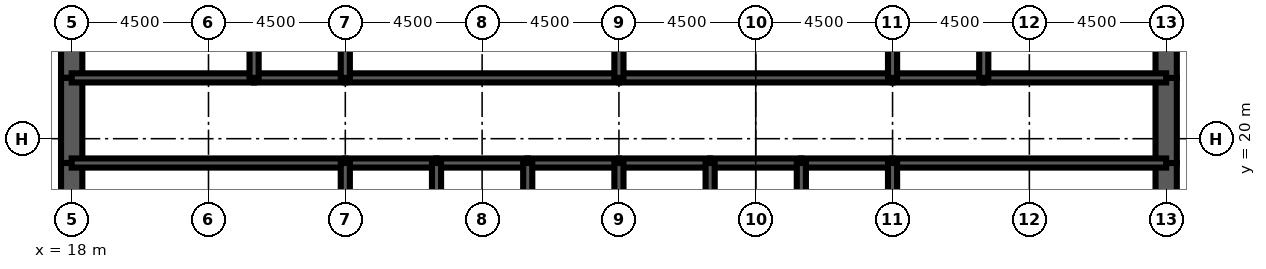
"""IFC4 building model, lengths in metres.
Left out: names, types, materials, properties, quantities, classifications, styles, units other than length and angle.
Written with IfcOpenShell. Run it as: python <this file> out.ifc"""

import sys

from ifc_helpers import new_model, si_unit, direction, frame, frame_2d, origin, place, context, subcontext, project, spatial, rectangle, extrude, element, fill, save


model = new_model("IFC4")
c1 = context("Model", 3, precision=1e-05, world=origin(), true_north=direction((0.0, 1.0)))
c2 = subcontext(c1, "Body", "Model", "MODEL_VIEW")
j1 = project(units=[si_unit("LENGTHUNIT", "METRE"), si_unit("PLANEANGLEUNIT", "RADIAN")], contexts=[c1])
p1 = place(None, origin())
s1 = spatial("IfcSite", under=j1, at=p1, CompositionType="ELEMENT")
p2 = place(p1, origin())
s2 = spatial("IfcBuilding", under=s1, at=p2, CompositionType="ELEMENT")
p3 = place(p2, frame((0.0, 0.0, 313.1)))
s3 = spatial("IfcBuildingStorey", under=s2, at=p3, CompositionType="ELEMENT", Elevation=313.1)
p4 = place(p3, frame((18.0, 26.0, 0.0), z_axis=(0.0, 0.0, 1.0), x_axis=(0.0, -1.0, 0.0)))
e1 = element("IfcWall", 1, at=p4, inside=s3, PredefinedType="SHEAR", context=c2, shape_type="SweptSolid", body=[
    extrude(rectangle(XDim=4.0, YDim=0.7, at=frame_2d((2.0, 0.0))), origin(), (0.0, 0.0, 1.0), 4.2),
])
p5 = place(p3, frame((18.0, 22.0, 0.0), z_axis=(0.0, 0.0, 1.0), x_axis=(0.0, -1.0, 0.0)))
e2 = element("IfcWall", 2, at=p5, inside=s3, PredefinedType="SHEAR", context=c2, shape_type="SweptSolid", body=[
    extrude(rectangle(XDim=2.8, YDim=0.7, at=frame_2d((1.4, 0.0))), origin(), (0.0, 0.0, 1.0), 4.2),
])
p6 = place(p5, frame((0.6, 0.0, 0.0)))
e3 = element("IfcOpeningElement", 3, at=p6, cuts=e2, PredefinedType="OPENING", context=c2, shape_type="SweptSolid", body=[
    extrude(rectangle(XDim=1.8, YDim=2.1, at=frame_2d((0.9, 1.05))), frame((0.0, 0.36, 0.0), z_axis=(0.0, -1.0, 0.0), x_axis=(1.0, 0.0, 0.0)), (0.0, 0.0, 1.0), 0.72),
])
for number, where, z_axis, x_axis in (
    (4, (18.0, 19.2, 0.0), (0.0, 0.0, 1.0), (0.0, -1.0, 0.0)),
    (5, (54.0, 16.0, 0.0), (0.0, 0.0, 1.0), (0.0, 1.0, 0.0)),
):
    element("IfcWall", number, at=place(p3, frame(where, z_axis=z_axis, x_axis=x_axis)), inside=s3, PredefinedType="SHEAR", context=c2, shape_type="SweptSolid", body=[
        extrude(rectangle(XDim=3.2, YDim=0.7, at=frame_2d((1.6, 0.0))), origin(), (0.0, 0.0, 1.0), 4.2),
    ])
p7 = place(p3, frame((54.0, 19.2, 0.0), z_axis=(0.0, 0.0, 1.0), x_axis=(0.0, 1.0, 0.0)))
e6 = element("IfcWall", 6, at=p7, inside=s3, PredefinedType="SHEAR", context=c2, shape_type="SweptSolid", body=[
    extrude(rectangle(XDim=2.8, YDim=0.7, at=frame_2d((1.4, 0.0))), origin(), (0.0, 0.0, 1.0), 4.2),
])
p8 = place(p7, frame((0.4, 0.0, 0.0)))
e7 = element("IfcOpeningElement", 7, at=p8, cuts=e6, PredefinedType="OPENING", context=c2, shape_type="SweptSolid", body=[
    extrude(rectangle(XDim=1.8, YDim=2.1, at=frame_2d((0.9, 1.05))), frame((0.0, 0.36, 0.0), z_axis=(0.0, -1.0, 0.0), x_axis=(1.0, 0.0, 0.0)), (0.0, 0.0, 1.0), 0.72),
])
p9 = place(p3, frame((54.0, 22.0, 0.0), z_axis=(0.0, 0.0, 1.0), x_axis=(0.0, 1.0, 0.0)))
e8 = element("IfcWall", 8, at=p9, inside=s3, PredefinedType="SHEAR", context=c2, shape_type="SweptSolid", body=[
    extrude(rectangle(XDim=4.0, YDim=0.7, at=frame_2d((2.0, 0.0))), origin(), (0.0, 0.0, 1.0), 4.2),
])
p10 = place(p3, frame((18.0, 19.2, 0.0), z_axis=(0.0, 0.0, 1.0), x_axis=(1.0, 0.0, 0.0)))
e9 = element("IfcWall", 9, at=p10, inside=s3, PredefinedType="SOLIDWALL", context=c2, shape_type="SweptSolid", body=[
    extrude(rectangle(XDim=9.0, YDim=0.3, at=frame_2d((4.5, 0.0))), origin(), (0.0, 0.0, 1.0), 4.2),
])
p11 = place(p10, frame((0.65, 0.0, 0.0)))
e10 = element("IfcOpeningElement", 10, at=p11, cuts=e9, PredefinedType="OPENING", context=c2, shape_type="SweptSolid", body=[
    extrude(rectangle(XDim=1.0, YDim=2.1, at=frame_2d((0.5, 1.05))), frame((0.0, 0.16, 0.0), z_axis=(0.0, -1.0, 0.0), x_axis=(1.0, 0.0, 0.0)), (0.0, 0.0, 1.0), 0.32),
])
p12 = place(p3, frame((27.0, 19.2, 0.0), z_axis=(0.0, 0.0, 1.0), x_axis=(1.0, 0.0, 0.0)))
e11 = element("IfcWall", 11, at=p12, inside=s3, PredefinedType="SOLIDWALL", context=c2, shape_type="SweptSolid", body=[
    extrude(rectangle(XDim=3.0, YDim=0.3, at=frame_2d((1.5, 0.0))), origin(), (0.0, 0.0, 1.0), 4.2),
])
p13 = place(p12, frame((0.95, 0.0, 0.0)))
e12 = element("IfcOpeningElement", 12, at=p13, cuts=e11, PredefinedType="OPENING", context=c2, shape_type="SweptSolid", body=[
    extrude(rectangle(XDim=1.1, YDim=2.2, at=frame_2d((0.55, 1.1))), frame((0.0, 0.16, 0.0), z_axis=(0.0, -1.0, 0.0), x_axis=(1.0, 0.0, 0.0)), (0.0, 0.0, 1.0), 0.32),
])
p14 = place(p3, frame((30.0, 19.2, 0.0), z_axis=(0.0, 0.0, 1.0), x_axis=(1.0, 0.0, 0.0)))
e13 = element("IfcWall", 13, at=p14, inside=s3, PredefinedType="SOLIDWALL", context=c2, shape_type="SweptSolid", body=[
    extrude(rectangle(XDim=3.0, YDim=0.3, at=frame_2d((1.5, 0.0))), origin(), (0.0, 0.0, 1.0), 4.2),
])
p15 = place(p14, frame((0.95, 0.0, 0.0)))
e14 = element("IfcOpeningElement", 14, at=p15, cuts=e13, PredefinedType="OPENING", context=c2, shape_type="SweptSolid", body=[
    extrude(rectangle(XDim=1.1, YDim=2.2, at=frame_2d((0.55, 1.1))), frame((0.0, 0.16, 0.0), z_axis=(0.0, -1.0, 0.0), x_axis=(1.0, 0.0, 0.0)), (0.0, 0.0, 1.0), 0.32),
])
p16 = place(p3, frame((33.0, 19.2, 0.0), z_axis=(0.0, 0.0, 1.0), x_axis=(1.0, 0.0, 0.0)))
e15 = element("IfcWall", 15, at=p16, inside=s3, PredefinedType="SOLIDWALL", context=c2, shape_type="SweptSolid", body=[
    extrude(rectangle(XDim=3.0, YDim=0.3, at=frame_2d((1.5, 0.0))), origin(), (0.0, 0.0, 1.0), 4.2),
])
p17 = place(p16, frame((0.95, 0.0, 0.0)))
e16 = element("IfcOpeningElement", 16, at=p17, cuts=e15, PredefinedType="OPENING", context=c2, shape_type="SweptSolid", body=[
    extrude(rectangle(XDim=1.1, YDim=2.2, at=frame_2d((0.55, 1.1))), frame((0.0, 0.16, 0.0), z_axis=(0.0, -1.0, 0.0), x_axis=(1.0, 0.0, 0.0)), (0.0, 0.0, 1.0), 0.32),
])
p18 = place(p3, frame((36.0, 19.2, 0.0), z_axis=(0.0, 0.0, 1.0), x_axis=(1.0, 0.0, 0.0)))
e17 = element("IfcWall", 17, at=p18, inside=s3, PredefinedType="SOLIDWALL", context=c2, shape_type="SweptSolid", body=[
    extrude(rectangle(XDim=3.0, YDim=0.3, at=frame_2d((1.5, 0.0))), origin(), (0.0, 0.0, 1.0), 4.2),
])
p19 = place(p18, frame((0.95, 0.0, 0.0)))
e18 = element("IfcOpeningElement", 18, at=p19, cuts=e17, PredefinedType="OPENING", context=c2, shape_type="SweptSolid", body=[
    extrude(rectangle(XDim=1.1, YDim=2.2, at=frame_2d((0.55, 1.1))), frame((0.0, 0.16, 0.0), z_axis=(0.0, -1.0, 0.0), x_axis=(1.0, 0.0, 0.0)), (0.0, 0.0, 1.0), 0.32),
])
p20 = place(p3, frame((39.0, 19.2, 0.0), z_axis=(0.0, 0.0, 1.0), x_axis=(1.0, 0.0, 0.0)))
e19 = element("IfcWall", 19, at=p20, inside=s3, PredefinedType="SOLIDWALL", context=c2, shape_type="SweptSolid", body=[
    extrude(rectangle(XDim=3.0, YDim=0.3, at=frame_2d((1.5, 0.0))), origin(), (0.0, 0.0, 1.0), 4.2),
])
p21 = place(p20, frame((1.0, 0.0, 0.0)))
e20 = element("IfcOpeningElement", 20, at=p21, cuts=e19, PredefinedType="OPENING", context=c2, shape_type="SweptSolid", body=[
    extrude(rectangle(XDim=1.0, YDim=2.1, at=frame_2d((0.5, 1.05))), frame((0.0, 0.16, 0.0), z_axis=(0.0, -1.0, 0.0), x_axis=(1.0, 0.0, 0.0)), (0.0, 0.0, 1.0), 0.32),
])
p22 = place(p3, frame((42.0, 19.2, 0.0), z_axis=(0.0, 0.0, 1.0), x_axis=(1.0, 0.0, 0.0)))
e21 = element("IfcWall", 21, at=p22, inside=s3, PredefinedType="SOLIDWALL", context=c2, shape_type="SweptSolid", body=[
    extrude(rectangle(XDim=3.0, YDim=0.3, at=frame_2d((1.5, 0.0))), origin(), (0.0, 0.0, 1.0), 4.2),
])
p23 = place(p22, frame((1.0, 0.0, 0.0)))
e22 = element("IfcOpeningElement", 22, at=p23, cuts=e21, PredefinedType="OPENING", context=c2, shape_type="SweptSolid", body=[
    extrude(rectangle(XDim=1.0, YDim=2.1, at=frame_2d((0.5, 1.05))), frame((0.0, 0.16, 0.0), z_axis=(0.0, -1.0, 0.0), x_axis=(1.0, 0.0, 0.0)), (0.0, 0.0, 1.0), 0.32),
])
p24 = place(p3, frame((45.0, 19.2, 0.0), z_axis=(0.0, 0.0, 1.0), x_axis=(1.0, 0.0, 0.0)))
e23 = element("IfcWall", 23, at=p24, inside=s3, PredefinedType="SOLIDWALL", context=c2, shape_type="SweptSolid", body=[
    extrude(rectangle(XDim=9.0, YDim=0.3, at=frame_2d((4.5, 0.0))), origin(), (0.0, 0.0, 1.0), 4.2),
])
p25 = place(p24, frame((7.35, 0.0, 0.0)))
e24 = element("IfcOpeningElement", 24, at=p25, cuts=e23, PredefinedType="OPENING", context=c2, shape_type="SweptSolid", body=[
    extrude(rectangle(XDim=1.0, YDim=2.1, at=frame_2d((0.5, 1.05))), frame((0.0, 0.16, 0.0), z_axis=(0.0, -1.0, 0.0), x_axis=(1.0, 0.0, 0.0)), (0.0, 0.0, 1.0), 0.32),
])
p26 = place(p3, frame((18.0, 22.0, 0.0), z_axis=(0.0, 0.0, 1.0), x_axis=(1.0, 0.0, 0.0)))
e25 = element("IfcWall", 25, at=p26, inside=s3, PredefinedType="SOLIDWALL", context=c2, shape_type="SweptSolid", body=[
    extrude(rectangle(XDim=6.0, YDim=0.3, at=frame_2d((3.0, 0.0))), origin(), (0.0, 0.0, 1.0), 4.2),
])
p27 = place(p26, frame((4.4, 0.0, 0.0)))
e26 = element("IfcOpeningElement", 26, at=p27, cuts=e25, PredefinedType="OPENING", context=c2, shape_type="SweptSolid", body=[
    extrude(rectangle(XDim=1.0, YDim=2.1, at=frame_2d((0.5, 1.05))), frame((0.0, 0.16, 0.0), z_axis=(0.0, -1.0, 0.0), x_axis=(1.0, 0.0, 0.0)), (0.0, 0.0, 1.0), 0.32),
])
p28 = place(p26, frame((0.75, 0.0, 0.0)))
e27 = element("IfcOpeningElement", 27, at=p28, cuts=e25, PredefinedType="OPENING", context=c2, shape_type="SweptSolid", body=[
    extrude(rectangle(XDim=1.0, YDim=2.1, at=frame_2d((0.5, 1.05))), frame((0.0, 0.16, 0.0), z_axis=(0.0, -1.0, 0.0), x_axis=(1.0, 0.0, 0.0)), (0.0, 0.0, 1.0), 0.32),
])
p29 = place(p3, frame((24.0, 22.0, 0.0), z_axis=(0.0, 0.0, 1.0), x_axis=(1.0, 0.0, 0.0)))
e28 = element("IfcWall", 28, at=p29, inside=s3, PredefinedType="SOLIDWALL", context=c2, shape_type="SweptSolid", body=[
    extrude(rectangle(XDim=3.0, YDim=0.3, at=frame_2d((1.5, 0.0))), origin(), (0.0, 0.0, 1.0), 4.2),
])
p30 = place(p29, frame((1.0, 0.0, 0.0)))
e29 = element("IfcOpeningElement", 29, at=p30, cuts=e28, PredefinedType="OPENING", context=c2, shape_type="SweptSolid", body=[
    extrude(rectangle(XDim=1.0, YDim=2.1, at=frame_2d((0.5, 1.05))), frame((0.0, 0.16, 0.0), z_axis=(0.0, -1.0, 0.0), x_axis=(1.0, 0.0, 0.0)), (0.0, 0.0, 1.0), 0.32),
])
p31 = place(p3, frame((27.0, 22.0, 0.0), z_axis=(0.0, 0.0, 1.0), x_axis=(1.0, 0.0, 0.0)))
e30 = element("IfcWall", 30, at=p31, inside=s3, PredefinedType="SOLIDWALL", context=c2, shape_type="SweptSolid", body=[
    extrude(rectangle(XDim=9.0, YDim=0.3, at=frame_2d((4.5, 0.0))), origin(), (0.0, 0.0, 1.0), 4.2),
])
p32 = place(p31, frame((4.0, 0.0, 0.0)))
e31 = element("IfcOpeningElement", 31, at=p32, cuts=e30, PredefinedType="OPENING", context=c2, shape_type="SweptSolid", body=[
    extrude(rectangle(XDim=1.0, YDim=2.1, at=frame_2d((0.5, 1.05))), frame((0.0, 0.16, 0.0), z_axis=(0.0, -1.0, 0.0), x_axis=(1.0, 0.0, 0.0)), (0.0, 0.0, 1.0), 0.32),
])
p33 = place(p3, frame((36.0, 22.0, 0.0), z_axis=(0.0, 0.0, 1.0), x_axis=(1.0, 0.0, 0.0)))
e32 = element("IfcWall", 32, at=p33, inside=s3, PredefinedType="SOLIDWALL", context=c2, shape_type="SweptSolid", body=[
    extrude(rectangle(XDim=9.0, YDim=0.3, at=frame_2d((4.5, 0.0))), origin(), (0.0, 0.0, 1.0), 4.2),
])
p34 = place(p33, frame((4.0, 0.0, 0.0)))
e33 = element("IfcOpeningElement", 33, at=p34, cuts=e32, PredefinedType="OPENING", context=c2, shape_type="SweptSolid", body=[
    extrude(rectangle(XDim=1.0, YDim=2.1, at=frame_2d((0.5, 1.05))), frame((0.0, 0.16, 0.0), z_axis=(0.0, -1.0, 0.0), x_axis=(1.0, 0.0, 0.0)), (0.0, 0.0, 1.0), 0.32),
])
p35 = place(p3, frame((45.0, 22.0, 0.0), z_axis=(0.0, 0.0, 1.0), x_axis=(1.0, 0.0, 0.0)))
e34 = element("IfcWall", 34, at=p35, inside=s3, PredefinedType="SOLIDWALL", context=c2, shape_type="SweptSolid", body=[
    extrude(rectangle(XDim=3.0, YDim=0.3, at=frame_2d((1.5, 0.0))), origin(), (0.0, 0.0, 1.0), 4.2),
])
p36 = place(p35, frame((1.0, 0.0, 0.0)))
e35 = element("IfcOpeningElement", 35, at=p36, cuts=e34, PredefinedType="OPENING", context=c2, shape_type="SweptSolid", body=[
    extrude(rectangle(XDim=1.0, YDim=2.1, at=frame_2d((0.5, 1.05))), frame((0.0, 0.16, 0.0), z_axis=(0.0, -1.0, 0.0), x_axis=(1.0, 0.0, 0.0)), (0.0, 0.0, 1.0), 0.32),
])
p37 = place(p3, frame((48.0, 22.0, 0.0), z_axis=(0.0, 0.0, 1.0), x_axis=(1.0, 0.0, 0.0)))
e36 = element("IfcWall", 36, at=p37, inside=s3, PredefinedType="SOLIDWALL", context=c2, shape_type="SweptSolid", body=[
    extrude(rectangle(XDim=6.0, YDim=0.3, at=frame_2d((3.0, 0.0))), origin(), (0.0, 0.0, 1.0), 4.2),
])
p38 = place(p37, frame((2.0, 0.0, 0.0)))
e37 = element("IfcOpeningElement", 37, at=p38, cuts=e36, PredefinedType="OPENING", context=c2, shape_type="SweptSolid", body=[
    extrude(rectangle(XDim=1.0, YDim=2.1, at=frame_2d((0.5, 1.05))), frame((0.0, 0.16, 0.0), z_axis=(0.0, -1.0, 0.0), x_axis=(1.0, 0.0, 0.0)), (0.0, 0.0, 1.0), 0.32),
])
p39 = place(p37, frame((4.25, 0.0, 0.0)))
e38 = element("IfcOpeningElement", 38, at=p39, cuts=e36, PredefinedType="OPENING", context=c2, shape_type="SweptSolid", body=[
    extrude(rectangle(XDim=1.0, YDim=2.1, at=frame_2d((0.5, 1.05))), frame((0.0, 0.16, 0.0), z_axis=(0.0, -1.0, 0.0), x_axis=(1.0, 0.0, 0.0)), (0.0, 0.0, 1.0), 0.32),
])
for number, where, z_axis, x_axis in (
    (39, (27.0, 16.0, 0.0), (0.0, 0.0, 1.0), (0.0, 1.0, 0.0)),
    (40, (30.0, 16.0, 0.0), (0.0, 0.0, 1.0), (0.0, 1.0, 0.0)),
    (41, (33.0, 16.0, 0.0), (0.0, 0.0, 1.0), (0.0, 1.0, 0.0)),
    (42, (36.0, 16.0, 0.0), (0.0, 0.0, 1.0), (0.0, 1.0, 0.0)),
    (43, (39.0, 16.0, 0.0), (0.0, 0.0, 1.0), (0.0, 1.0, 0.0)),
    (44, (42.0, 16.0, 0.0), (0.0, 0.0, 1.0), (0.0, 1.0, 0.0)),
    (45, (45.0, 16.0, 0.0), (0.0, 0.0, 1.0), (0.0, 1.0, 0.0)),
):
    element("IfcWall", number, at=place(p3, frame(where, z_axis=z_axis, x_axis=x_axis)), inside=s3, PredefinedType="SOLIDWALL", context=c2, shape_type="SweptSolid", body=[
        extrude(rectangle(XDim=3.2, YDim=0.3, at=frame_2d((1.6, 0.0))), origin(), (0.0, 0.0, 1.0), 4.2),
    ])
for number, where, z_axis, x_axis in (
    (46, (24.0, 22.0, 0.0), (0.0, 0.0, 1.0), (0.0, 1.0, 0.0)),
    (47, (27.0, 22.0, 0.0), (0.0, 0.0, 1.0), (0.0, 1.0, 0.0)),
    (48, (36.0, 22.0, 0.0), (0.0, 0.0, 1.0), (0.0, 1.0, 0.0)),
    (49, (45.0, 22.0, 0.0), (0.0, 0.0, 1.0), (0.0, 1.0, 0.0)),
    (50, (48.0, 22.0, 0.0), (0.0, 0.0, 1.0), (0.0, 1.0, 0.0)),
):
    element("IfcWall", number, at=place(p3, frame(where, z_axis=z_axis, x_axis=x_axis)), inside=s3, PredefinedType="SOLIDWALL", context=c2, shape_type="SweptSolid", body=[
        extrude(rectangle(XDim=4.0, YDim=0.3, at=frame_2d((2.0, 0.0))), origin(), (0.0, 0.0, 1.0), 4.2),
    ])
for number, where, z_axis, x_axis in (
    (51, (20.225, 22.15, 0.0), (0.0, 0.0, 1.0), (0.0, 1.0, 0.0)),
    (52, (51.775, 22.15, 0.0), (0.0, 0.0, 1.0), (0.0, 1.0, 0.0)),
):
    element("IfcWall", number, at=place(p3, frame(where, z_axis=z_axis, x_axis=x_axis)), inside=s3, PredefinedType="PARTITIONING", context=c2, shape_type="SweptSolid", body=[
        extrude(rectangle(XDim=3.7, YDim=0.15, at=frame_2d((1.85, 0.0))), origin(), (0.0, 0.0, 1.0), 3.0),
    ])
p40 = place(p13, origin())
e53 = element("IfcDoor", 53, at=p40, inside=s3, OperationType="DOUBLE_DOOR_SLIDING", PredefinedType="USERDEFINED", context=c2, shape_type="SweptSolid", body=[
    extrude(rectangle(XDim=1.1, YDim=2.2, at=frame_2d((0.55, 1.1))), frame((0.0, 0.025, 0.0), z_axis=(0.0, -1.0, 0.0), x_axis=(1.0, 0.0, 0.0)), (0.0, 0.0, 1.0), 0.05),
])
fill(e12, e53)
p41 = place(p15, origin())
e54 = element("IfcDoor", 54, at=p41, inside=s3, OperationType="DOUBLE_DOOR_SLIDING", PredefinedType="USERDEFINED", context=c2, shape_type="SweptSolid", body=[
    extrude(rectangle(XDim=1.1, YDim=2.2, at=frame_2d((0.55, 1.1))), frame((0.0, 0.025, 0.0), z_axis=(0.0, -1.0, 0.0), x_axis=(1.0, 0.0, 0.0)), (0.0, 0.0, 1.0), 0.05),
])
fill(e14, e54)
p42 = place(p17, origin())
e55 = element("IfcDoor", 55, at=p42, inside=s3, OperationType="DOUBLE_DOOR_SLIDING", PredefinedType="USERDEFINED", context=c2, shape_type="SweptSolid", body=[
    extrude(rectangle(XDim=1.1, YDim=2.2, at=frame_2d((0.55, 1.1))), frame((0.0, 0.025, 0.0), z_axis=(0.0, -1.0, 0.0), x_axis=(1.0, 0.0, 0.0)), (0.0, 0.0, 1.0), 0.05),
])
fill(e16, e55)
p43 = place(p19, origin())
e56 = element("IfcDoor", 56, at=p43, inside=s3, OperationType="DOUBLE_DOOR_SLIDING", PredefinedType="USERDEFINED", context=c2, shape_type="SweptSolid", body=[
    extrude(rectangle(XDim=1.1, YDim=2.2, at=frame_2d((0.55, 1.1))), frame((0.0, 0.025, 0.0), z_axis=(0.0, -1.0, 0.0), x_axis=(1.0, 0.0, 0.0)), (0.0, 0.0, 1.0), 0.05),
])
fill(e18, e56)
p44 = place(p11, origin())
e57 = element("IfcDoor", 57, at=p44, inside=s3, OperationType="SINGLE_SWING_LEFT", PredefinedType="DOOR", context=c2, shape_type="SweptSolid", body=[
    extrude(rectangle(XDim=1.0, YDim=2.1, at=frame_2d((0.5, 1.05))), frame((0.0, 0.025, 0.0), z_axis=(0.0, -1.0, 0.0), x_axis=(1.0, 0.0, 0.0)), (0.0, 0.0, 1.0), 0.05),
])
fill(e10, e57)
p45 = place(p25, origin())
e58 = element("IfcDoor", 58, at=p45, inside=s3, OperationType="SINGLE_SWING_RIGHT", PredefinedType="DOOR", context=c2, shape_type="SweptSolid", body=[
    extrude(rectangle(XDim=1.0, YDim=2.1, at=frame_2d((0.5, 1.05))), frame((0.0, 0.025, 0.0), z_axis=(0.0, -1.0, 0.0), x_axis=(1.0, 0.0, 0.0)), (0.0, 0.0, 1.0), 0.05),
])
fill(e24, e58)
p46 = place(p6, origin())
e59 = element("IfcDoor", 59, at=p46, inside=s3, OperationType="SINGLE_SWING_LEFT", PredefinedType="DOOR", context=c2, shape_type="SweptSolid", body=[
    extrude(rectangle(XDim=1.8, YDim=2.1, at=frame_2d((0.9, 1.05))), frame((0.0, 0.35, 0.0), z_axis=(0.0, -1.0, 0.0), x_axis=(1.0, 0.0, 0.0)), (0.0, 0.0, 1.0), 0.699),
])
fill(e3, e59)
p47 = place(p8, origin())
e60 = element("IfcDoor", 60, at=p47, inside=s3, OperationType="SINGLE_SWING_LEFT", PredefinedType="DOOR", context=c2, shape_type="SweptSolid", body=[
    extrude(rectangle(XDim=1.8, YDim=2.1, at=frame_2d((0.9, 1.05))), frame((0.0, 0.35, 0.0), z_axis=(0.0, -1.0, 0.0), x_axis=(1.0, 0.0, 0.0)), (0.0, 0.0, 1.0), 0.699),
])
fill(e7, e60)
p48 = place(p27, origin())
e61 = element("IfcDoor", 61, at=p48, inside=s3, OperationType="SINGLE_SWING_RIGHT", PredefinedType="DOOR", context=c2, shape_type="SweptSolid", body=[
    extrude(rectangle(XDim=1.0, YDim=2.1, at=frame_2d((0.5, 1.05))), frame((0.0, 0.025, 0.0), z_axis=(0.0, -1.0, 0.0), x_axis=(1.0, 0.0, 0.0)), (0.0, 0.0, 1.0), 0.05),
])
fill(e26, e61)
p49 = place(p30, origin())
e62 = element("IfcDoor", 62, at=p49, inside=s3, OperationType="SINGLE_SWING_LEFT", PredefinedType="DOOR", context=c2, shape_type="SweptSolid", body=[
    extrude(rectangle(XDim=1.0, YDim=2.1, at=frame_2d((0.5, 1.05))), frame((0.0, 0.025, 0.0), z_axis=(0.0, -1.0, 0.0), x_axis=(1.0, 0.0, 0.0)), (0.0, 0.0, 1.0), 0.05),
])
fill(e29, e62)
p50 = place(p32, origin())
e63 = element("IfcDoor", 63, at=p50, inside=s3, OperationType="SINGLE_SWING_LEFT", PredefinedType="DOOR", context=c2, shape_type="SweptSolid", body=[
    extrude(rectangle(XDim=1.0, YDim=2.1, at=frame_2d((0.5, 1.05))), frame((0.0, 0.025, 0.0), z_axis=(0.0, -1.0, 0.0), x_axis=(1.0, 0.0, 0.0)), (0.0, 0.0, 1.0), 0.05),
])
fill(e31, e63)
p51 = place(p34, origin())
e64 = element("IfcDoor", 64, at=p51, inside=s3, OperationType="SINGLE_SWING_LEFT", PredefinedType="DOOR", context=c2, shape_type="SweptSolid", body=[
    extrude(rectangle(XDim=1.0, YDim=2.1, at=frame_2d((0.5, 1.05))), frame((0.0, 0.025, 0.0), z_axis=(0.0, -1.0, 0.0), x_axis=(1.0, 0.0, 0.0)), (0.0, 0.0, 1.0), 0.05),
])
fill(e33, e64)
p52 = place(p36, origin())
e65 = element("IfcDoor", 65, at=p52, inside=s3, OperationType="SINGLE_SWING_LEFT", PredefinedType="DOOR", context=c2, shape_type="SweptSolid", body=[
    extrude(rectangle(XDim=1.0, YDim=2.1, at=frame_2d((0.5, 1.05))), frame((0.0, 0.025, 0.0), z_axis=(0.0, -1.0, 0.0), x_axis=(1.0, 0.0, 0.0)), (0.0, 0.0, 1.0), 0.05),
])
fill(e35, e65)
p53 = place(p38, origin())
e66 = element("IfcDoor", 66, at=p53, inside=s3, OperationType="SINGLE_SWING_LEFT", PredefinedType="DOOR", context=c2, shape_type="SweptSolid", body=[
    extrude(rectangle(XDim=1.0, YDim=2.1, at=frame_2d((0.5, 1.05))), frame((0.0, 0.025, 0.0), z_axis=(0.0, -1.0, 0.0), x_axis=(1.0, 0.0, 0.0)), (0.0, 0.0, 1.0), 0.05),
])
fill(e37, e66)
p54 = place(p28, origin())
e67 = element("IfcDoor", 67, at=p54, inside=s3, OperationType="SINGLE_SWING_LEFT", PredefinedType="DOOR", context=c2, shape_type="SweptSolid", body=[
    extrude(rectangle(XDim=1.0, YDim=2.1, at=frame_2d((0.5, 1.05))), frame((0.0, 0.025, 0.0), z_axis=(0.0, -1.0, 0.0), x_axis=(1.0, 0.0, 0.0)), (0.0, 0.0, 1.0), 0.05),
])
fill(e27, e67)
p55 = place(p39, origin())
e68 = element("IfcDoor", 68, at=p55, inside=s3, OperationType="SINGLE_SWING_RIGHT", PredefinedType="DOOR", context=c2, shape_type="SweptSolid", body=[
    extrude(rectangle(XDim=1.0, YDim=2.1, at=frame_2d((0.5, 1.05))), frame((0.0, 0.025, 0.0), z_axis=(0.0, -1.0, 0.0), x_axis=(1.0, 0.0, 0.0)), (0.0, 0.0, 1.0), 0.05),
])
fill(e38, e68)
p56 = place(p21, origin())
e69 = element("IfcDoor", 69, at=p56, inside=s3, OperationType="SINGLE_SWING_LEFT", PredefinedType="DOOR", context=c2, shape_type="SweptSolid", body=[
    extrude(rectangle(XDim=1.0, YDim=2.1, at=frame_2d((0.5, 1.05))), frame((0.0, 0.025, 0.0), z_axis=(0.0, -1.0, 0.0), x_axis=(1.0, 0.0, 0.0)), (0.0, 0.0, 1.0), 0.05),
])
fill(e20, e69)
p57 = place(p23, origin())
e70 = element("IfcDoor", 70, at=p57, inside=s3, OperationType="SINGLE_SWING_LEFT", PredefinedType="DOOR", context=c2, shape_type="SweptSolid", body=[
    extrude(rectangle(XDim=1.0, YDim=2.1, at=frame_2d((0.5, 1.05))), frame((0.0, 0.025, 0.0), z_axis=(0.0, -1.0, 0.0), x_axis=(1.0, 0.0, 0.0)), (0.0, 0.0, 1.0), 0.05),
])
fill(e22, e70)
save(model, sys.argv[1])
